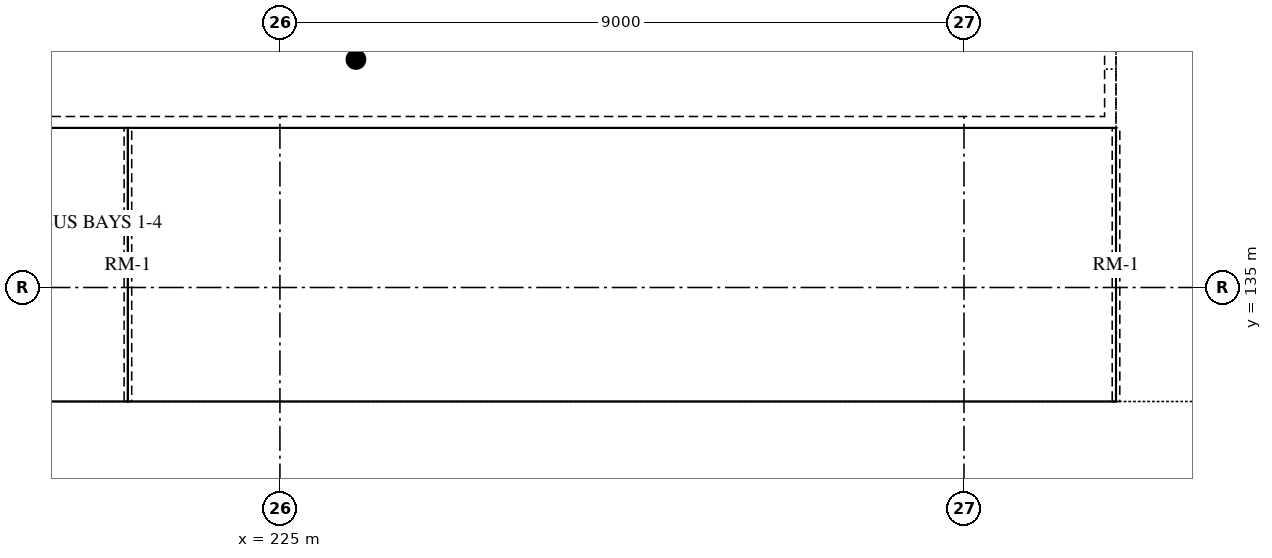
"""IFC4 building model, lengths in metres.
Left out: names, types, materials, properties, quantities, classifications, styles, units other than length and angle.
Written with IfcOpenShell. Run it as: python <this file> out.ifc"""

import sys

from ifc_helpers import new_model, si_unit, direction, frame, origin, origin_2d, place, context, subcontext, project, spatial, hollow_circle, extrude, element, save


model = new_model("IFC4")
c1 = context("Model", 3, precision=1e-05, world=origin(), true_north=direction((0.0, 1.0)))
c2 = subcontext(c1, "Body", "Model", "MODEL_VIEW")
j1 = project(units=[si_unit("LENGTHUNIT", "METRE"), si_unit("PLANEANGLEUNIT", "RADIAN")], contexts=[c1])
p1 = place(None, origin())
s1 = spatial("IfcSite", under=j1, at=p1, CompositionType="ELEMENT")
p2 = place(p1, origin())
s2 = spatial("IfcBuilding", under=s1, at=p2, CompositionType="ELEMENT")
p3 = place(p2, origin())
s3 = spatial("IfcBuildingStorey", under=s2, at=p3, CompositionType="ELEMENT", Elevation=0.0)
p4 = place(p3, frame((226.0, 138.0, -2.1), z_axis=(0.0, 0.0, 1.0), x_axis=(1.0, 0.0, 0.0)))
e1 = element("IfcColumn", 1, at=p4, inside=s3, PredefinedType="COLUMN", context=c2, shape_type="SweptSolid", body=[
    extrude(hollow_circle(Radius=0.097, WallThickness=0.008, at=origin_2d()), origin(), (0.0, 0.0, 1.0), 6.66),
])
save(model, sys.argv[1])
